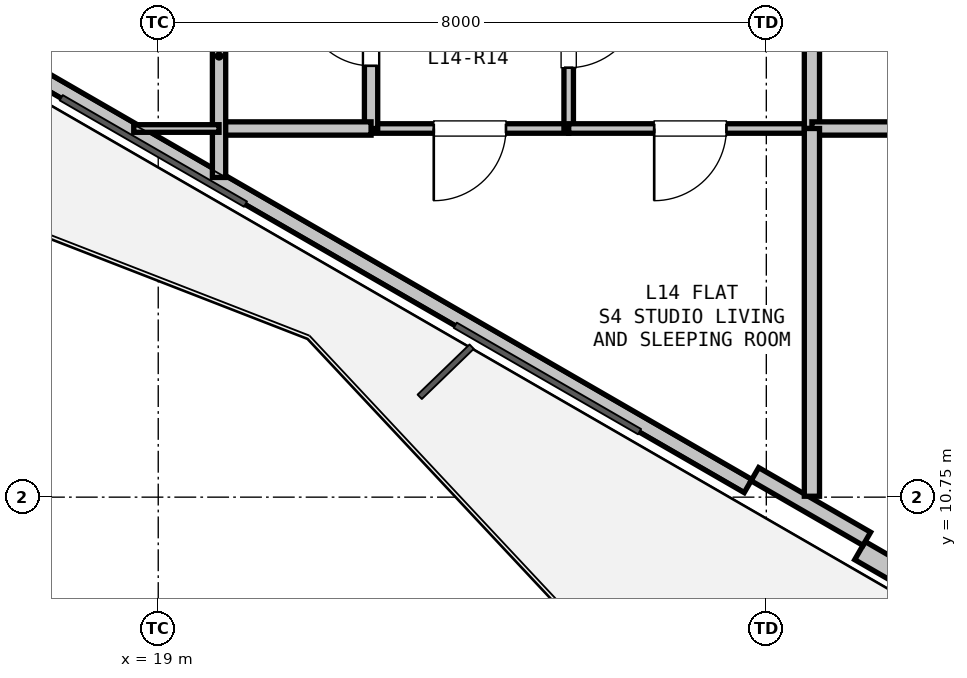
"""IFC4 building model, lengths in metres.
Left out: names, types, materials, properties, quantities, classifications, styles, units other than length and angle.
Written with IfcOpenShell. Run it as: python <this file> out.ifc"""

import sys

from ifc_helpers import new_model, si_unit, direction, frame, frame_2d, origin, place, context, subcontext, project, spatial, rectangle, extrude, element, fill, save


model = new_model("IFC4")
c1 = context("Model", 3, precision=1e-05, world=origin(), true_north=direction((0.0, 1.0)))
c2 = subcontext(c1, "Body", "Model", "MODEL_VIEW")
j1 = project(units=[si_unit("LENGTHUNIT", "METRE"), si_unit("PLANEANGLEUNIT", "RADIAN")], contexts=[c1])
p1 = place(None, origin())
s1 = spatial("IfcSite", under=j1, at=p1, CompositionType="ELEMENT")
p2 = place(p1, origin())
s2 = spatial("IfcBuilding", under=s1, at=p2, CompositionType="ELEMENT")
p3 = place(p2, frame((0.0, 0.0, 52.2)))
s3 = spatial("IfcBuildingStorey", under=s2, at=p3, CompositionType="ELEMENT", Elevation=52.2)
p4 = place(p3, frame((39.207, 3.71, 0.0), z_axis=(0.0, 0.0, 1.0), x_axis=(-0.86603192154, 0.499988710747, 0.0)))
e1 = element("IfcWall", 1, at=p4, inside=s3, PredefinedType="SOLIDWALL", context=c2, shape_type="SweptSolid", body=[
    extrude(rectangle(XDim=12.673, YDim=0.275, at=frame_2d((6.336, 0.0))), origin(), (0.0, 0.0, 1.0), 2.66),
])
p5 = place(p4, frame((8.136, 0.0, 0.0)))
e2 = element("IfcOpeningElement", 2, at=p5, cuts=e1, PredefinedType="OPENING", context=c2, shape_type="SweptSolid", body=[
    extrude(rectangle(XDim=1.1, YDim=2.1, at=frame_2d((0.55, 1.05))), frame((0.0, 0.147, 0.0), z_axis=(0.0, -1.0, 0.0), x_axis=(1.0, 0.0, 0.0)), (0.0, 0.0, 1.0), 0.295),
])
p6 = place(p4, frame((2.971, 0.0, 0.9)))
e3 = element("IfcOpeningElement", 3, at=p6, cuts=e1, PredefinedType="OPENING", context=c2, shape_type="SweptSolid", body=[
    extrude(rectangle(XDim=1.2, YDim=1.4, at=frame_2d((0.6, 0.7))), frame((0.0, 0.147, 0.0), z_axis=(0.0, -1.0, 0.0), x_axis=(1.0, 0.0, 0.0)), (0.0, 0.0, 1.0), 0.295),
])
p7 = place(p3, frame((26.76, 10.896, 0.0), z_axis=(0.0, 0.0, 1.0), x_axis=(-0.866027351828, 0.499996625875, 0.0)))
e4 = element("IfcWall", 4, at=p7, inside=s3, PredefinedType="PARAPET", context=c2, shape_type="SweptSolid", body=[
    extrude(rectangle(XDim=11.973, YDim=0.2, at=frame_2d((5.987, 0.0))), origin(), (0.0, 0.0, 1.0), 0.2),
])
p8 = place(p3, frame((28.322, 10.202, 0.0), z_axis=(0.0, 0.0, 1.0), x_axis=(-0.86605165483, 0.499954529098, 0.0)))
e5 = element("IfcWall", 5, at=p8, inside=s3, PredefinedType="PARAPET", context=c2, shape_type="SweptSolid", body=[
    extrude(rectangle(XDim=1.7, YDim=0.2, at=frame_2d((0.85, 0.0))), origin(), (0.0, 0.0, 1.0), 2.66),
])
p9 = place(p3, frame((24.4, 15.6, 0.0), z_axis=(0.0, 0.0, 1.0), x_axis=(-1.0, 0.0, 0.0)))
e6 = element("IfcWall", 6, at=p9, inside=s3, PredefinedType="PARTITIONING", context=c2, shape_type="SweptSolid", body=[
    extrude(rectangle(XDim=2.6, YDim=0.125, at=frame_2d((1.3, 0.0))), origin(), (0.0, 0.0, 1.0), 3.04),
])
p10 = place(p9, frame((0.825, 0.0, 0.0)))
e7 = element("IfcOpeningElement", 7, at=p10, cuts=e6, PredefinedType="OPENING", context=c2, shape_type="SweptSolid", body=[
    extrude(rectangle(XDim=0.95, YDim=2.1, at=frame_2d((0.475, 1.05))), frame((0.0, 0.073, 0.0), z_axis=(0.0, -1.0, 0.0), x_axis=(1.0, 0.0, 0.0)), (0.0, 0.0, 1.0), 0.145),
])
p11 = place(p3, frame((21.8, 15.6, 0.0), z_axis=(0.0, 0.0, 1.0), x_axis=(0.0, 1.0, 0.0)))
e8 = element("IfcWall", 8, at=p11, inside=s3, PredefinedType="PLUMBINGWALL", context=c2, shape_type="SweptSolid", body=[
    extrude(rectangle(XDim=2.55, YDim=0.175, at=frame_2d((1.275, 0.0))), origin(), (0.0, 0.0, 1.0), 3.04),
])
p12 = place(p11, frame((0.825, 0.0, 0.0)))
e9 = element("IfcOpeningElement", 9, at=p12, cuts=e8, PredefinedType="OPENING", context=c2, shape_type="SweptSolid", body=[
    extrude(rectangle(XDim=0.9, YDim=2.1, at=frame_2d((0.45, 1.05))), frame((0.0, 0.097, 0.0), z_axis=(0.0, -1.0, 0.0), x_axis=(1.0, 0.0, 0.0)), (0.0, 0.0, 1.0), 0.195),
])
p13 = place(p3, frame((24.4, 18.15, 0.0), z_axis=(0.0, 0.0, 1.0), x_axis=(0.0, -1.0, 0.0)))
e10 = element("IfcWall", 10, at=p13, inside=s3, PredefinedType="PARTITIONING", context=c2, shape_type="SweptSolid", body=[
    extrude(rectangle(XDim=2.55, YDim=0.125, at=frame_2d((1.275, 0.0))), origin(), (0.0, 0.0, 1.0), 2.338),
])
p14 = place(p13, frame((0.8, 0.0, 0.0)))
e11 = element("IfcOpeningElement", 11, at=p14, cuts=e10, PredefinedType="OPENING", context=c2, shape_type="SweptSolid", body=[
    extrude(rectangle(XDim=0.95, YDim=2.1, at=frame_2d((0.475, 1.05))), frame((0.0, 0.073, 0.0), z_axis=(0.0, -1.0, 0.0), x_axis=(1.0, 0.0, 0.0)), (0.0, 0.0, 1.0), 0.145),
])
p15 = place(p3, frame((21.8, 15.6, 0.0), z_axis=(0.0, 0.0, 1.0), x_axis=(-1.0, 0.0, 0.0)))
e12 = element("IfcWall", 12, at=p15, inside=s3, PredefinedType="PLUMBINGWALL", context=c2, shape_type="SweptSolid", body=[
    extrude(rectangle(XDim=2.0, YDim=0.175, at=frame_2d((1.0, 0.0))), origin(), (0.0, 0.0, 1.0), 2.365),
])
p16 = place(p3, frame((19.8, 14.956, 0.0), z_axis=(0.0, 0.0, 1.0), x_axis=(0.0, 1.0, 0.0)))
e13 = element("IfcWall", 13, at=p16, inside=s3, PredefinedType="PLUMBINGWALL", context=c2, shape_type="SweptSolid", body=[
    extrude(rectangle(XDim=3.194, YDim=0.175, at=frame_2d((1.597, 0.0))), origin(), (0.0, 0.0, 1.0), 2.365),
])
p17 = place(p3, frame((27.6, 15.6, 0.0), z_axis=(0.0, 0.0, 1.0), x_axis=(-1.0, 0.0, 0.0)))
e14 = element("IfcWall", 14, at=p17, inside=s3, PredefinedType="PARTITIONING", context=c2, shape_type="SweptSolid", body=[
    extrude(rectangle(XDim=3.2, YDim=0.125, at=frame_2d((1.6, 0.0))), origin(), (0.0, 0.0, 1.0), 2.338),
])
p18 = place(p17, frame((1.125, 0.0, 0.0)))
e15 = element("IfcOpeningElement", 15, at=p18, cuts=e14, PredefinedType="OPENING", context=c2, shape_type="SweptSolid", body=[
    extrude(rectangle(XDim=0.95, YDim=2.1, at=frame_2d((0.475, 1.05))), frame((0.0, 0.073, 0.0), z_axis=(0.0, -1.0, 0.0), x_axis=(1.0, 0.0, 0.0)), (0.0, 0.0, 1.0), 0.145),
])
p19 = place(p3, frame((27.6, 18.15, 0.0), z_axis=(0.0, 0.0, 1.0), x_axis=(0.0, -1.0, 0.0)))
e16 = element("IfcWall", 16, at=p19, inside=s3, PredefinedType="PARTITIONING", context=c2, shape_type="SweptSolid", body=[
    extrude(rectangle(XDim=2.55, YDim=0.2, at=frame_2d((1.275, 0.0))), origin(), (0.0, 0.0, 1.0), 3.04),
])
p20 = place(p3, frame((29.6, 15.6, 0.0), z_axis=(0.0, 0.0, 1.0), x_axis=(-1.0, 0.0, 0.0)))
e17 = element("IfcWall", 17, at=p20, inside=s3, PredefinedType="PLUMBINGWALL", context=c2, shape_type="SweptSolid", body=[
    extrude(rectangle(XDim=2.0, YDim=0.175, at=frame_2d((1.0, 0.0))), origin(), (0.0, 0.0, 1.0), 3.04),
])
p21 = place(p3, frame((18.678, 15.6, 0.0), z_axis=(0.0, 0.0, 1.0), x_axis=(1.0, 0.0, 0.0)))
e18 = element("IfcWall", 18, at=p21, inside=s3, PredefinedType="PARTITIONING", context=c2, shape_type="SweptSolid", body=[
    extrude(rectangle(XDim=1.122, YDim=0.1, at=frame_2d((0.561, 0.0))), origin(), (0.0, 0.0, 1.0), 2.365),
])
p22 = place(p3, frame((27.6, 15.6, 0.0), z_axis=(0.0, 0.0, 1.0), x_axis=(0.0, -1.0, 0.0)))
e19 = element("IfcWall", 19, at=p22, inside=s3, PredefinedType="PARTITIONING", context=c2, shape_type="SweptSolid", body=[
    extrude(rectangle(XDim=4.838, YDim=0.2, at=frame_2d((2.419, 0.0))), origin(), (0.0, 0.0, 1.0), 2.338),
])
p23 = place(p12, origin())
e20 = element("IfcDoor", 20, at=p23, inside=s3, OperationType="SINGLE_SWING_RIGHT", PredefinedType="DOOR", context=c2, shape_type="SweptSolid", body=[
    extrude(rectangle(XDim=0.9, YDim=2.1, at=frame_2d((0.45, 1.05))), frame((0.0, 0.025, 0.0), z_axis=(0.0, -1.0, 0.0), x_axis=(1.0, 0.0, 0.0)), (0.0, 0.0, 1.0), 0.05),
])
fill(e9, e20)
p24 = place(p14, origin())
e21 = element("IfcDoor", 21, at=p24, inside=s3, OperationType="SINGLE_SWING_LEFT", PredefinedType="DOOR", context=c2, shape_type="SweptSolid", body=[
    extrude(rectangle(XDim=0.95, YDim=2.1, at=frame_2d((0.475, 1.05))), frame((0.0, 0.025, 0.0), z_axis=(0.0, -1.0, 0.0), x_axis=(1.0, 0.0, 0.0)), (0.0, 0.0, 1.0), 0.05),
])
fill(e11, e21)
p25 = place(p10, origin())
e22 = element("IfcDoor", 22, at=p25, inside=s3, OperationType="SINGLE_SWING_RIGHT", PredefinedType="DOOR", context=c2, shape_type="SweptSolid", body=[
    extrude(rectangle(XDim=0.95, YDim=2.1, at=frame_2d((0.475, 1.05))), frame((0.0, 0.025, 0.0), z_axis=(0.0, -1.0, 0.0), x_axis=(1.0, 0.0, 0.0)), (0.0, 0.0, 1.0), 0.05),
])
fill(e7, e22)
p26 = place(p18, origin())
e23 = element("IfcDoor", 23, at=p26, inside=s3, OperationType="SINGLE_SWING_RIGHT", PredefinedType="DOOR", context=c2, shape_type="SweptSolid", body=[
    extrude(rectangle(XDim=0.95, YDim=2.1, at=frame_2d((0.475, 1.05))), frame((0.0, 0.025, 0.0), z_axis=(0.0, -1.0, 0.0), x_axis=(1.0, 0.0, 0.0)), (0.0, 0.0, 1.0), 0.05),
])
fill(e15, e23)
save(model, sys.argv[1])
